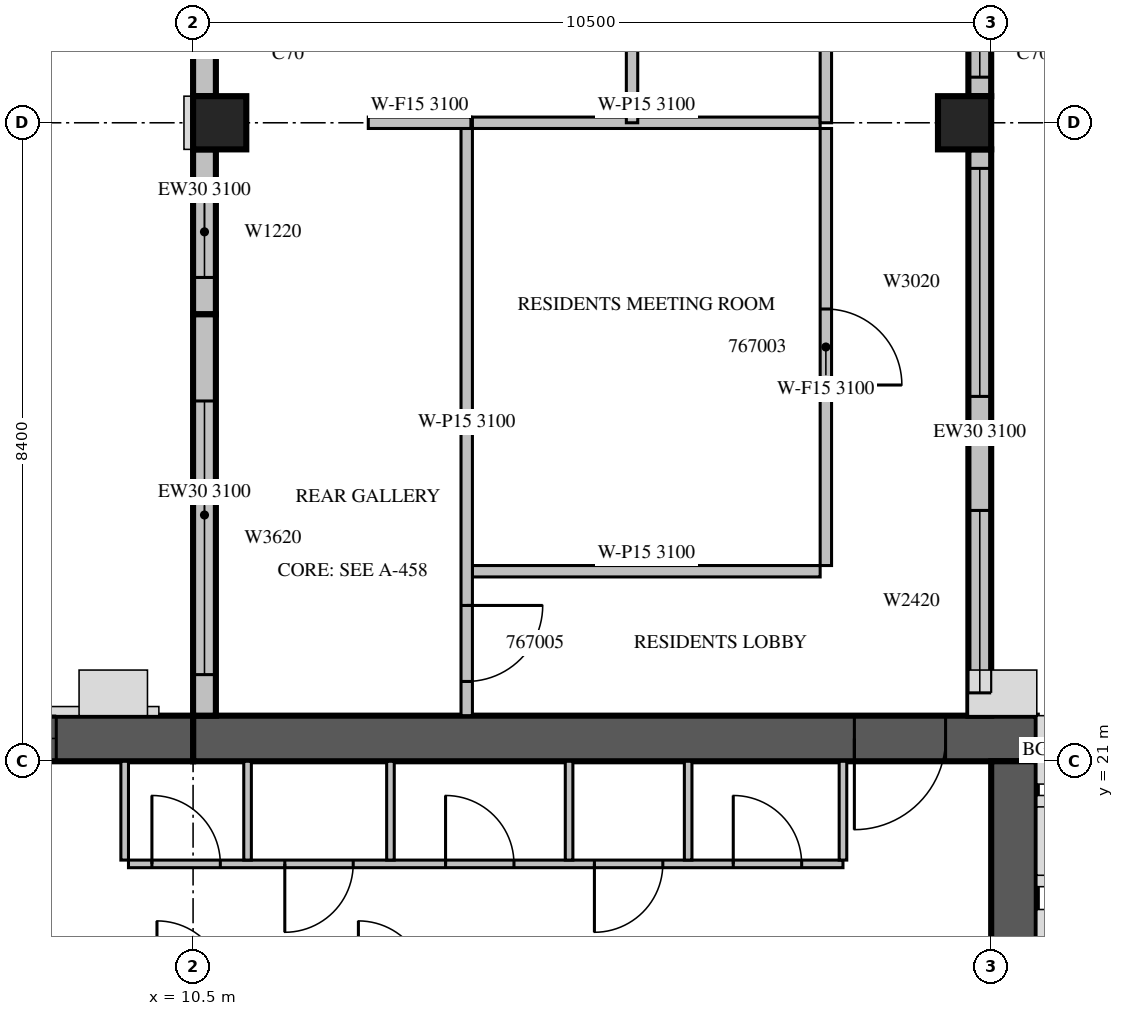
"""IFC4 building model, lengths in metres.
Left out: names, types, materials, properties, quantities, classifications, styles, units other than length and angle.
Written with IfcOpenShell. Run it as: python <this file> out.ifc"""

import sys

from ifc_helpers import new_model, si_unit, direction, frame, frame_2d, origin, origin_2d, place, context, subcontext, project, spatial, rectangle, extrude, source, transform, mapped, element, fill, save


model = new_model("IFC4")
c1 = context("Model", 3, precision=1e-05, world=origin(), true_north=direction((0.0, 1.0)))
c2 = subcontext(c1, "Body", "Model", "MODEL_VIEW")
j1 = project(units=[si_unit("LENGTHUNIT", "METRE"), si_unit("PLANEANGLEUNIT", "RADIAN")], contexts=[c1])
p1 = place(None, origin())
s1 = spatial("IfcSite", under=j1, at=p1, CompositionType="ELEMENT")
p2 = place(p1, origin())
s2 = spatial("IfcBuilding", under=s1, at=p2, CompositionType="ELEMENT")
p3 = place(p2, frame((0.0, 0.0, 295.0)))
s3 = spatial("IfcBuildingStorey", under=s2, at=p3, CompositionType="ELEMENT", Elevation=295.0)
m1 = source(origin(), c2, "Body", "SweptSolid", [
    extrude(rectangle(XDim=0.7, YDim=0.7, at=origin_2d()), origin(), (0.0, 0.0, 1.0), 3.5),
])
for number, where, z_axis, x_axis in (
    (1, (10.85, 29.4, 0.0), (0.0, 0.0, 1.0), (1.0, 0.0, 0.0)),
    (2, (20.65, 29.4, 0.0), (0.0, 0.0, 1.0), (1.0, 0.0, 0.0)),
):
    element("IfcColumn", number, at=place(p3, frame(where, z_axis=z_axis, x_axis=x_axis)), inside=s3, PredefinedType="COLUMN", context=c2, shape_type="MappedRepresentation", body=[
        mapped(m1, transform((0.0, 0.0, 0.0), scale=1.0)),
    ])
m2 = source(origin(), c2, "Body", "SweptSolid", [
    extrude(rectangle(XDim=11.1, YDim=0.6, at=frame_2d((5.55, 0.0))), origin(), (0.0, 0.0, 1.0), 3.5),
])
p4 = place(p3, frame((10.5, 21.3, 0.0), z_axis=(0.0, 0.0, 1.0), x_axis=(1.0, 0.0, 0.0)))
e3 = element("IfcWall", 3, at=p4, inside=s3, PredefinedType="SHEAR", context=c2, shape_type="MappedRepresentation", body=[
    mapped(m2, transform((0.0, 0.0, 0.0), scale=1.0)),
])
m3 = source(origin(), c2, "Body", "SweptSolid", [
    extrude(rectangle(XDim=1.2, YDim=2.1, at=frame_2d((0.6, 1.05))), frame((0.0, 0.31, 0.0), z_axis=(0.0, -1.0, 0.0), x_axis=(1.0, 0.0, 0.0)), (0.0, 0.0, 1.0), 0.62),
])
p5 = place(p4, frame((8.7, 0.0, 0.0)))
e4 = element("IfcOpeningElement", 4, at=p5, cuts=e3, PredefinedType="OPENING", context=c2, shape_type="MappedRepresentation", body=[
    mapped(m3, transform((0.0, 0.0, 0.0), scale=1.0)),
])
m4 = source(origin(), c2, "Body", "SweptSolid", [
    extrude(rectangle(XDim=10.5, YDim=0.6, at=frame_2d((5.25, 0.0))), origin(), (0.0, 0.0, 1.0), 3.5),
])
p6 = place(p3, frame((21.3, 10.5, 0.0), z_axis=(0.0, 0.0, 1.0), x_axis=(0.0, 1.0, 0.0)))
e5 = element("IfcWall", 5, at=p6, inside=s3, PredefinedType="SHEAR", context=c2, shape_type="MappedRepresentation", body=[
    mapped(m4, transform((0.0, 0.0, 0.0), scale=1.0)),
])
m5 = source(origin(), c2, "Body", "SweptSolid", [
    extrude(rectangle(XDim=1.2, YDim=2.4, at=frame_2d((0.6, 1.2))), frame((0.0, 0.31, 0.0), z_axis=(0.0, -1.0, 0.0), x_axis=(1.0, 0.0, 0.0)), (0.0, 0.0, 1.0), 0.62),
])
p7 = place(p6, frame((5.7, 0.0, 0.6)))
e6 = element("IfcOpeningElement", 6, at=p7, cuts=e5, PredefinedType="OPENING", context=c2, shape_type="MappedRepresentation", body=[
    mapped(m5, transform((0.0, 0.0, 0.0), scale=1.0)),
])
m6 = source(origin(), c2, "Body", "SweptSolid", [
    extrude(rectangle(XDim=6.6, YDim=0.6, at=frame_2d((3.3, 0.0))), origin(), (0.0, 0.0, 1.0), 3.5),
])
p8 = place(p3, frame((3.9, 21.3, 0.0), z_axis=(0.0, 0.0, 1.0), x_axis=(1.0, 0.0, 0.0)))
e7 = element("IfcWall", 7, at=p8, inside=s3, PredefinedType="SHEAR", context=c2, shape_type="MappedRepresentation", body=[
    mapped(m6, transform((0.0, 0.0, 0.0), scale=1.0)),
])
p9 = place(p8, frame((1.5, 0.0, 0.6)))
e8 = element("IfcOpeningElement", 8, at=p9, cuts=e7, PredefinedType="OPENING", context=c2, shape_type="MappedRepresentation", body=[
    mapped(m5, transform((0.0, 0.0, 0.0), scale=1.0)),
])
p10 = place(p8, frame((3.6, 0.0, 0.6)))
e9 = element("IfcOpeningElement", 9, at=p10, cuts=e7, PredefinedType="OPENING", context=c2, shape_type="MappedRepresentation", body=[
    mapped(m5, transform((0.0, 0.0, 0.0), scale=1.0)),
])
m7 = source(origin(), c2, "Body", "SweptSolid", [
    extrude(rectangle(XDim=7.45, YDim=0.3, at=frame_2d((3.725, 0.0))), origin(), (0.0, 0.0, 1.0), 3.1),
])
p11 = place(p3, frame((20.85, 21.6, 0.0), z_axis=(0.0, 0.0, 1.0), x_axis=(0.0, 1.0, 0.0)))
e10 = element("IfcWall", 10, at=p11, inside=s3, PredefinedType="STANDARD", context=c2, shape_type="MappedRepresentation", body=[
    mapped(m7, transform((0.0, 0.0, 0.0), scale=1.0)),
])
m8 = source(origin(), c2, "Body", "SweptSolid", [
    extrude(rectangle(XDim=2.4, YDim=2.0, at=frame_2d((1.2, 1.0))), frame((0.0, 0.16, 0.0), z_axis=(0.0, -1.0, 0.0), x_axis=(1.0, 0.0, 0.0)), (0.0, 0.0, 1.0), 0.32),
])
p12 = place(p11, frame((0.3, 0.0, 0.6)))
e11 = element("IfcOpeningElement", 11, at=p12, cuts=e10, PredefinedType="OPENING", context=c2, shape_type="MappedRepresentation", body=[
    mapped(m8, transform((0.0, 0.0, 0.0), scale=1.0)),
])
m9 = source(origin(), c2, "Body", "SweptSolid", [
    extrude(rectangle(XDim=3.0, YDim=2.0, at=frame_2d((1.5, 1.0))), frame((0.0, 0.16, 0.0), z_axis=(0.0, -1.0, 0.0), x_axis=(1.0, 0.0, 0.0)), (0.0, 0.0, 1.0), 0.32),
])
p13 = place(p11, frame((4.2, 0.0, 0.6)))
e12 = element("IfcOpeningElement", 12, at=p13, cuts=e10, PredefinedType="OPENING", context=c2, shape_type="MappedRepresentation", body=[
    mapped(m9, transform((0.0, 0.0, 0.0), scale=1.0)),
])
m10 = source(origin(), c2, "Body", "SweptSolid", [
    extrude(rectangle(XDim=7.7, YDim=0.3, at=frame_2d((3.85, 0.0))), origin(), (0.0, 0.0, 1.0), 2.6),
])
p14 = place(p3, frame((20.85, 29.75, 0.0), z_axis=(0.0, 0.0, 1.0), x_axis=(0.0, 1.0, 0.0)))
e13 = element("IfcWall", 13, at=p14, inside=s3, PredefinedType="STANDARD", context=c2, shape_type="MappedRepresentation", body=[
    mapped(m10, transform((0.0, 0.0, 0.0), scale=1.0)),
])
p15 = place(p14, frame((0.25, 0.0, 0.6)))
e14 = element("IfcOpeningElement", 14, at=p15, cuts=e13, PredefinedType="OPENING", context=c2, shape_type="MappedRepresentation", body=[
    mapped(m9, transform((0.0, 0.0, 0.0), scale=1.0)),
])
p16 = place(p14, frame((4.45, 0.0, 0.6)))
e15 = element("IfcOpeningElement", 15, at=p16, cuts=e13, PredefinedType="OPENING", context=c2, shape_type="MappedRepresentation", body=[
    mapped(m9, transform((0.0, 0.0, 0.0), scale=1.0)),
])
m11 = source(origin(), c2, "Body", "SweptSolid", [
    extrude(rectangle(XDim=1.33, YDim=0.3, at=frame_2d((0.665, 0.0))), origin(), (0.0, 0.0, 1.0), 3.1),
])
p17 = place(p3, frame((10.65, 31.08, 0.0), z_axis=(0.0, 0.0, 1.0), x_axis=(0.0, -1.0, 0.0)))
e16 = element("IfcWall", 16, at=p17, inside=s3, PredefinedType="STANDARD", context=c2, shape_type="MappedRepresentation", body=[
    mapped(m11, transform((0.0, 0.0, 0.0), scale=1.0)),
])
m12 = source(origin(), c2, "Body", "SweptSolid", [
    extrude(rectangle(XDim=2.17, YDim=0.3, at=frame_2d((1.085, 0.0))), origin(), (0.0, 0.0, 1.0), 3.1),
])
p18 = place(p3, frame((10.65, 29.05, 0.0), z_axis=(0.0, 0.0, 1.0), x_axis=(0.0, -1.0, 0.0)))
e17 = element("IfcWall", 17, at=p18, inside=s3, PredefinedType="STANDARD", context=c2, shape_type="MappedRepresentation", body=[
    mapped(m12, transform((0.0, 0.0, 0.0), scale=1.0)),
])
m13 = source(origin(), c2, "Body", "SweptSolid", [
    extrude(rectangle(XDim=1.2, YDim=2.0, at=frame_2d((0.6, 1.0))), frame((0.0, 0.16, 0.0), z_axis=(0.0, -1.0, 0.0), x_axis=(1.0, 0.0, 0.0)), (0.0, 0.0, 1.0), 0.32),
])
p19 = place(p18, frame((0.485, 0.0, 0.6)))
e18 = element("IfcOpeningElement", 18, at=p19, cuts=e17, PredefinedType="OPENING", context=c2, shape_type="MappedRepresentation", body=[
    mapped(m13, transform((0.0, 0.0, 0.0), scale=1.0)),
])
m14 = source(origin(), c2, "Body", "SweptSolid", [
    extrude(rectangle(XDim=5.28, YDim=0.3, at=frame_2d((2.64, 0.0))), origin(), (0.0, 0.0, 1.0), 3.1),
])
p20 = place(p3, frame((10.65, 26.88, 0.0), z_axis=(0.0, 0.0, 1.0), x_axis=(0.0, -1.0, 0.0)))
e19 = element("IfcWall", 19, at=p20, inside=s3, PredefinedType="STANDARD", context=c2, shape_type="MappedRepresentation", body=[
    mapped(m14, transform((0.0, 0.0, 0.0), scale=1.0)),
])
m15 = source(origin(), c2, "Body", "SweptSolid", [
    extrude(rectangle(XDim=3.6, YDim=2.0, at=frame_2d((1.8, 1.0))), frame((0.0, 0.16, 0.0), z_axis=(0.0, -1.0, 0.0), x_axis=(1.0, 0.0, 0.0)), (0.0, 0.0, 1.0), 0.32),
])
p21 = place(p20, frame((1.14, 0.0, 0.6)))
e20 = element("IfcOpeningElement", 20, at=p21, cuts=e19, PredefinedType="OPENING", context=c2, shape_type="MappedRepresentation", body=[
    mapped(m15, transform((0.0, 0.0, 0.0), scale=1.0)),
])
m16 = source(origin(), c2, "Body", "SweptSolid", [
    extrude(rectangle(XDim=9.4, YDim=0.1, at=frame_2d((4.7, 0.0))), origin(), (0.0, 0.0, 1.0), 3.1),
])
p22 = place(p3, frame((9.65, 19.65, 0.0), z_axis=(0.0, 0.0, 1.0), x_axis=(1.0, 0.0, 0.0)))
e21 = element("IfcWall", 21, at=p22, inside=s3, PredefinedType="PARTITIONING", context=c2, shape_type="MappedRepresentation", body=[
    mapped(m16, transform((0.0, 0.0, 0.0), scale=1.0)),
])
m17 = source(origin(), c2, "Body", "SweptSolid", [
    extrude(rectangle(XDim=0.9, YDim=2.1, at=frame_2d((0.45, 1.05))), frame((0.0, 0.06, 0.0), z_axis=(0.0, -1.0, 0.0), x_axis=(1.0, 0.0, 0.0)), (0.0, 0.0, 1.0), 0.12),
])
p23 = place(p22, frame((0.308, 0.0, 0.0)))
e22 = element("IfcOpeningElement", 22, at=p23, cuts=e21, PredefinedType="OPENING", context=c2, shape_type="MappedRepresentation", body=[
    mapped(m17, transform((0.0, 0.0, 0.0), scale=1.0)),
])
p24 = place(p22, frame((2.057, 0.0, 0.0)))
e23 = element("IfcOpeningElement", 23, at=p24, cuts=e21, PredefinedType="OPENING", context=c2, shape_type="MappedRepresentation", body=[
    mapped(m17, transform((0.0, 0.0, 0.0), scale=1.0)),
])
p25 = place(p22, frame((4.172, 0.0, 0.0)))
e24 = element("IfcOpeningElement", 24, at=p25, cuts=e21, PredefinedType="OPENING", context=c2, shape_type="MappedRepresentation", body=[
    mapped(m17, transform((0.0, 0.0, 0.0), scale=1.0)),
])
p26 = place(p22, frame((6.13, 0.0, 0.0)))
e25 = element("IfcOpeningElement", 25, at=p26, cuts=e21, PredefinedType="OPENING", context=c2, shape_type="MappedRepresentation", body=[
    mapped(m17, transform((0.0, 0.0, 0.0), scale=1.0)),
])
p27 = place(p22, frame((7.957, 0.0, 0.0)))
e26 = element("IfcOpeningElement", 26, at=p27, cuts=e21, PredefinedType="OPENING", context=c2, shape_type="MappedRepresentation", body=[
    mapped(m17, transform((0.0, 0.0, 0.0), scale=1.0)),
])
m18 = source(origin(), c2, "Body", "SweptSolid", [
    extrude(rectangle(XDim=1.3, YDim=0.1, at=frame_2d((0.65, 0.0))), origin(), (0.0, 0.0, 1.0), 3.1),
])
for number, where, z_axis, x_axis in (
    (27, (11.217, 19.7, 0.0), (0.0, 0.0, 1.0), (0.0, 1.0, 0.0)),
    (28, (13.097, 19.7, 0.0), (0.0, 0.0, 1.0), (0.0, 1.0, 0.0)),
    (29, (15.447, 19.7, 0.0), (0.0, 0.0, 1.0), (0.0, 1.0, 0.0)),
    (30, (17.013, 19.7, 0.0), (0.0, 0.0, 1.0), (0.0, 1.0, 0.0)),
    (31, (9.6, 19.7, 0.0), (0.0, 0.0, 1.0), (0.0, 1.0, 0.0)),
    (32, (19.05, 19.7, 0.0), (0.0, 0.0, 1.0), (0.0, 1.0, 0.0)),
):
    element("IfcWall", number, at=place(p3, frame(where, z_axis=z_axis, x_axis=x_axis)), inside=s3, PredefinedType="PARTITIONING", context=c2, shape_type="MappedRepresentation", body=[
        mapped(m18, transform((0.0, 0.0, 0.0), scale=1.0)),
    ])
m19 = source(origin(), c2, "Body", "SweptSolid", [
    extrude(rectangle(XDim=4.575, YDim=0.15, at=frame_2d((2.288, 0.0))), origin(), (0.0, 0.0, 1.0), 3.1),
])
for number, where, z_axis, x_axis in (
    (33, (14.175, 23.5, 0.0), (0.0, 0.0, 1.0), (1.0, 0.0, 0.0)),
    (34, (18.75, 29.4, 0.0), (0.0, 0.0, 1.0), (-1.0, 0.0, 0.0)),
):
    element("IfcWall", number, at=place(p3, frame(where, z_axis=z_axis, x_axis=x_axis)), inside=s3, PredefinedType="PARTITIONING", context=c2, shape_type="MappedRepresentation", body=[
        mapped(m19, transform((0.0, 0.0, 0.0), scale=1.0)),
    ])
m20 = source(origin(), c2, "Body", "SweptSolid", [
    extrude(rectangle(XDim=5.75, YDim=0.15, at=frame_2d((2.875, 0.0))), origin(), (0.0, 0.0, 1.0), 3.1),
])
p28 = place(p3, frame((18.825, 23.575, 0.0), z_axis=(0.0, 0.0, 1.0), x_axis=(0.0, 1.0, 0.0)))
e35 = element("IfcWall", 35, at=p28, inside=s3, PredefinedType="PARTITIONING", context=c2, shape_type="MappedRepresentation", body=[
    mapped(m20, transform((0.0, 0.0, 0.0), scale=1.0)),
])
m21 = source(origin(), c2, "Body", "SweptSolid", [
    extrude(rectangle(XDim=1.0, YDim=2.1, at=frame_2d((0.5, 1.05))), frame((0.0, 0.085, 0.0), z_axis=(0.0, -1.0, 0.0), x_axis=(1.0, 0.0, 0.0)), (0.0, 0.0, 1.0), 0.17),
])
p29 = place(p28, frame((2.375, 0.0, 0.0)))
e36 = element("IfcOpeningElement", 36, at=p29, cuts=e35, PredefinedType="OPENING", context=c2, shape_type="MappedRepresentation", body=[
    mapped(m21, transform((0.0, 0.0, 0.0), scale=1.0)),
])
m22 = source(origin(), c2, "Body", "SweptSolid", [
    extrude(rectangle(XDim=7.725, YDim=0.15, at=frame_2d((3.862, 0.0))), origin(), (0.0, 0.0, 1.0), 3.1),
])
p30 = place(p3, frame((14.1, 29.325, 0.0), z_axis=(0.0, 0.0, 1.0), x_axis=(0.0, -1.0, 0.0)))
e37 = element("IfcWall", 37, at=p30, inside=s3, PredefinedType="PARTITIONING", context=c2, shape_type="MappedRepresentation", body=[
    mapped(m22, transform((0.0, 0.0, 0.0), scale=1.0)),
])
p31 = place(p30, frame((6.275, 0.0, 0.0)))
e38 = element("IfcOpeningElement", 38, at=p31, cuts=e37, PredefinedType="OPENING", context=c2, shape_type="MappedRepresentation", body=[
    mapped(m21, transform((0.0, 0.0, 0.0), scale=1.0)),
])
m23 = source(origin(), c2, "Body", "SweptSolid", [
    extrude(rectangle(XDim=1.35, YDim=0.15, at=frame_2d((0.675, 0.0))), origin(), (0.0, 0.0, 1.0), 3.1),
])
p32 = place(p3, frame((14.155, 29.4, 0.0), z_axis=(0.0, 0.0, 1.0), x_axis=(-1.0, 0.0, 0.0)))
e39 = element("IfcWall", 39, at=p32, inside=s3, PredefinedType="PARTITIONING", context=c2, shape_type="MappedRepresentation", body=[
    mapped(m23, transform((0.0, 0.0, 0.0), scale=1.0)),
])
m24 = source(origin(), c2, "Body", "SweptSolid", [
    extrude(rectangle(XDim=8.4, YDim=0.15, at=frame_2d((4.2, 0.0))), origin(), (0.0, 0.0, 1.0), 2.6),
])
p33 = place(p3, frame((16.275, 29.4, 0.0), z_axis=(0.0, 0.0, 1.0), x_axis=(0.0, 1.0, 0.0)))
e40 = element("IfcWall", 40, at=p33, inside=s3, PredefinedType="PARTITIONING", context=c2, shape_type="MappedRepresentation", body=[
    mapped(m24, transform((0.0, 0.0, 0.0), scale=1.0)),
])
m25 = source(origin(), c2, "Body", "SweptSolid", [
    extrude(rectangle(XDim=1.2, YDim=2.1, at=frame_2d((0.6, 1.05))), frame((0.0, 0.085, 0.0), z_axis=(0.0, -1.0, 0.0), x_axis=(1.0, 0.0, 0.0)), (0.0, 0.0, 1.0), 0.17),
])
p34 = place(p33, frame((2.524, 0.0, 0.0)))
e41 = element("IfcOpeningElement", 41, at=p34, cuts=e40, PredefinedType="OPENING", context=c2, shape_type="MappedRepresentation", body=[
    mapped(m25, transform((0.0, 0.0, 0.0), scale=1.0)),
])
p35 = place(p3, frame((18.825, 29.4, 0.0), z_axis=(0.0, 0.0, 1.0), x_axis=(0.0, 1.0, 0.0)))
e42 = element("IfcWall", 42, at=p35, inside=s3, PredefinedType="PARTITIONING", context=c2, shape_type="MappedRepresentation", body=[
    mapped(m24, transform((0.0, 0.0, 0.0), scale=1.0)),
])
p36 = place(p35, frame((2.474, 0.0, 0.0)))
e43 = element("IfcOpeningElement", 43, at=p36, cuts=e42, PredefinedType="OPENING", context=c2, shape_type="MappedRepresentation", body=[
    mapped(m25, transform((0.0, 0.0, 0.0), scale=1.0)),
])
m26 = source(origin(), c2, "Body", "SweptSolid", [
    extrude(rectangle(XDim=0.9, YDim=2.1, at=frame_2d((0.45, 1.05))), frame((0.0, 0.085, 0.0), z_axis=(0.0, -1.0, 0.0), x_axis=(1.0, 0.0, 0.0)), (0.0, 0.0, 1.0), 0.17),
])
p37 = place(p35, frame((6.824, 0.0, 0.0)))
e44 = element("IfcOpeningElement", 44, at=p37, cuts=e42, PredefinedType="OPENING", context=c2, shape_type="MappedRepresentation", body=[
    mapped(m26, transform((0.0, 0.0, 0.0), scale=1.0)),
])
m27 = source(origin(), c2, "Body", "SweptSolid", [
    extrude(rectangle(XDim=2.4, YDim=2.0, at=frame_2d((1.2, 1.0))), frame((0.0, 0.03, 0.0), z_axis=(0.0, -1.0, 0.0), x_axis=(1.0, 0.0, 0.0)), (0.0, 0.0, 1.0), 0.06),
])
p38 = place(p12, origin())
e45 = element("IfcWindow", 45, at=p38, inside=s3, PartitioningType="SINGLE_PANEL", PredefinedType="WINDOW", context=c2, shape_type="MappedRepresentation", body=[
    mapped(m27, transform((0.0, 0.0, 0.0), scale=1.0)),
])
fill(e11, e45)
m28 = source(origin(), c2, "Body", "SweptSolid", [
    extrude(rectangle(XDim=3.0, YDim=2.0, at=frame_2d((1.5, 1.0))), frame((0.0, 0.03, 0.0), z_axis=(0.0, -1.0, 0.0), x_axis=(1.0, 0.0, 0.0)), (0.0, 0.0, 1.0), 0.06),
])
p39 = place(p13, origin())
e46 = element("IfcWindow", 46, at=p39, inside=s3, PartitioningType="SINGLE_PANEL", PredefinedType="WINDOW", context=c2, shape_type="MappedRepresentation", body=[
    mapped(m28, transform((0.0, 0.0, 0.0), scale=1.0)),
])
fill(e12, e46)
p40 = place(p15, origin())
e47 = element("IfcWindow", 47, at=p40, inside=s3, PartitioningType="SINGLE_PANEL", PredefinedType="WINDOW", context=c2, shape_type="MappedRepresentation", body=[
    mapped(m28, transform((0.0, 0.0, 0.0), scale=1.0)),
])
fill(e14, e47)
m29 = source(origin(), c2, "Body", "SweptSolid", [
    extrude(rectangle(XDim=1.2, YDim=2.0, at=frame_2d((0.6, 1.0))), frame((0.0, 0.03, 0.0), z_axis=(0.0, -1.0, 0.0), x_axis=(1.0, 0.0, 0.0)), (0.0, 0.0, 1.0), 0.06),
])
p41 = place(p19, origin())
e48 = element("IfcWindow", 48, at=p41, inside=s3, PartitioningType="SINGLE_PANEL", PredefinedType="WINDOW", context=c2, shape_type="MappedRepresentation", body=[
    mapped(m29, transform((0.0, 0.0, 0.0), scale=1.0)),
])
fill(e18, e48)
m30 = source(origin(), c2, "Body", "SweptSolid", [
    extrude(rectangle(XDim=3.6, YDim=2.0, at=frame_2d((1.8, 1.0))), frame((0.0, 0.03, 0.0), z_axis=(0.0, -1.0, 0.0), x_axis=(1.0, 0.0, 0.0)), (0.0, 0.0, 1.0), 0.06),
])
p42 = place(p21, origin())
e49 = element("IfcWindow", 49, at=p42, inside=s3, PartitioningType="SINGLE_PANEL", PredefinedType="WINDOW", context=c2, shape_type="MappedRepresentation", body=[
    mapped(m30, transform((0.0, 0.0, 0.0), scale=1.0)),
])
fill(e20, e49)
m31 = source(origin(), c2, "Body", "SweptSolid", [
    extrude(rectangle(XDim=0.9, YDim=2.1, at=frame_2d((0.45, 1.05))), frame((0.0, 0.025, 0.0), z_axis=(0.0, -1.0, 0.0), x_axis=(1.0, 0.0, 0.0)), (0.0, 0.0, 1.0), 0.05),
])
p43 = place(p23, origin())
e50 = element("IfcDoor", 50, at=p43, inside=s3, OperationType="SINGLE_SWING_LEFT", PredefinedType="DOOR", context=c2, shape_type="MappedRepresentation", body=[
    mapped(m31, transform((0.0, 0.0, 0.0), scale=1.0)),
])
fill(e22, e50)
p44 = place(p24, origin())
e51 = element("IfcDoor", 51, at=p44, inside=s3, OperationType="SINGLE_SWING_RIGHT", PredefinedType="DOOR", context=c2, shape_type="MappedRepresentation", body=[
    mapped(m31, transform((0.0, 0.0, 0.0), scale=1.0)),
])
fill(e23, e51)
p45 = place(p25, origin())
e52 = element("IfcDoor", 52, at=p45, inside=s3, OperationType="SINGLE_SWING_LEFT", PredefinedType="DOOR", context=c2, shape_type="MappedRepresentation", body=[
    mapped(m31, transform((0.0, 0.0, 0.0), scale=1.0)),
])
fill(e24, e52)
p46 = place(p26, origin())
e53 = element("IfcDoor", 53, at=p46, inside=s3, OperationType="SINGLE_SWING_RIGHT", PredefinedType="DOOR", context=c2, shape_type="MappedRepresentation", body=[
    mapped(m31, transform((0.0, 0.0, 0.0), scale=1.0)),
])
fill(e25, e53)
p47 = place(p27, origin())
e54 = element("IfcDoor", 54, at=p47, inside=s3, OperationType="SINGLE_SWING_LEFT", PredefinedType="DOOR", context=c2, shape_type="MappedRepresentation", body=[
    mapped(m31, transform((0.0, 0.0, 0.0), scale=1.0)),
])
fill(e26, e54)
m32 = source(origin(), c2, "Body", "SweptSolid", [
    extrude(rectangle(XDim=1.2, YDim=2.1, at=frame_2d((0.6, 1.05))), frame((0.0, 0.025, 0.0), z_axis=(0.0, -1.0, 0.0), x_axis=(1.0, 0.0, 0.0)), (0.0, 0.0, 1.0), 0.05),
])
p48 = place(p5, origin())
e55 = element("IfcDoor", 55, at=p48, inside=s3, OperationType="SINGLE_SWING_RIGHT", PredefinedType="DOOR", context=c2, shape_type="MappedRepresentation", body=[
    mapped(m32, transform((0.0, 0.0, 0.0), scale=1.0)),
])
fill(e4, e55)
m33 = source(origin(), c2, "Body", "SweptSolid", [
    extrude(rectangle(XDim=1.2, YDim=2.4, at=frame_2d((0.6, 1.2))), frame((0.0, 0.03, 0.0), z_axis=(0.0, -1.0, 0.0), x_axis=(1.0, 0.0, 0.0)), (0.0, 0.0, 1.0), 0.06),
])
p49 = place(p10, origin())
e56 = element("IfcWindow", 56, at=p49, inside=s3, PartitioningType="SINGLE_PANEL", PredefinedType="WINDOW", context=c2, shape_type="MappedRepresentation", body=[
    mapped(m33, transform((0.0, 0.0, 0.0), scale=1.0)),
])
fill(e9, e56)
m34 = source(origin(), c2, "Body", "SweptSolid", [
    extrude(rectangle(XDim=1.0, YDim=2.1, at=frame_2d((0.5, 1.05))), frame((0.0, 0.025, 0.0), z_axis=(0.0, -1.0, 0.0), x_axis=(1.0, 0.0, 0.0)), (0.0, 0.0, 1.0), 0.05),
])
p50 = place(p29, origin())
e57 = element("IfcDoor", 57, at=p50, inside=s3, OperationType="SINGLE_SWING_RIGHT", PredefinedType="DOOR", context=c2, shape_type="MappedRepresentation", body=[
    mapped(m34, transform((0.0, 0.0, 0.0), scale=1.0)),
])
fill(e36, e57)
p51 = place(p31, origin())
e58 = element("IfcDoor", 58, at=p51, inside=s3, OperationType="SINGLE_SWING_LEFT", PredefinedType="DOOR", context=c2, shape_type="MappedRepresentation", body=[
    mapped(m34, transform((0.0, 0.0, 0.0), scale=1.0)),
])
fill(e38, e58)
save(model, sys.argv[1])
